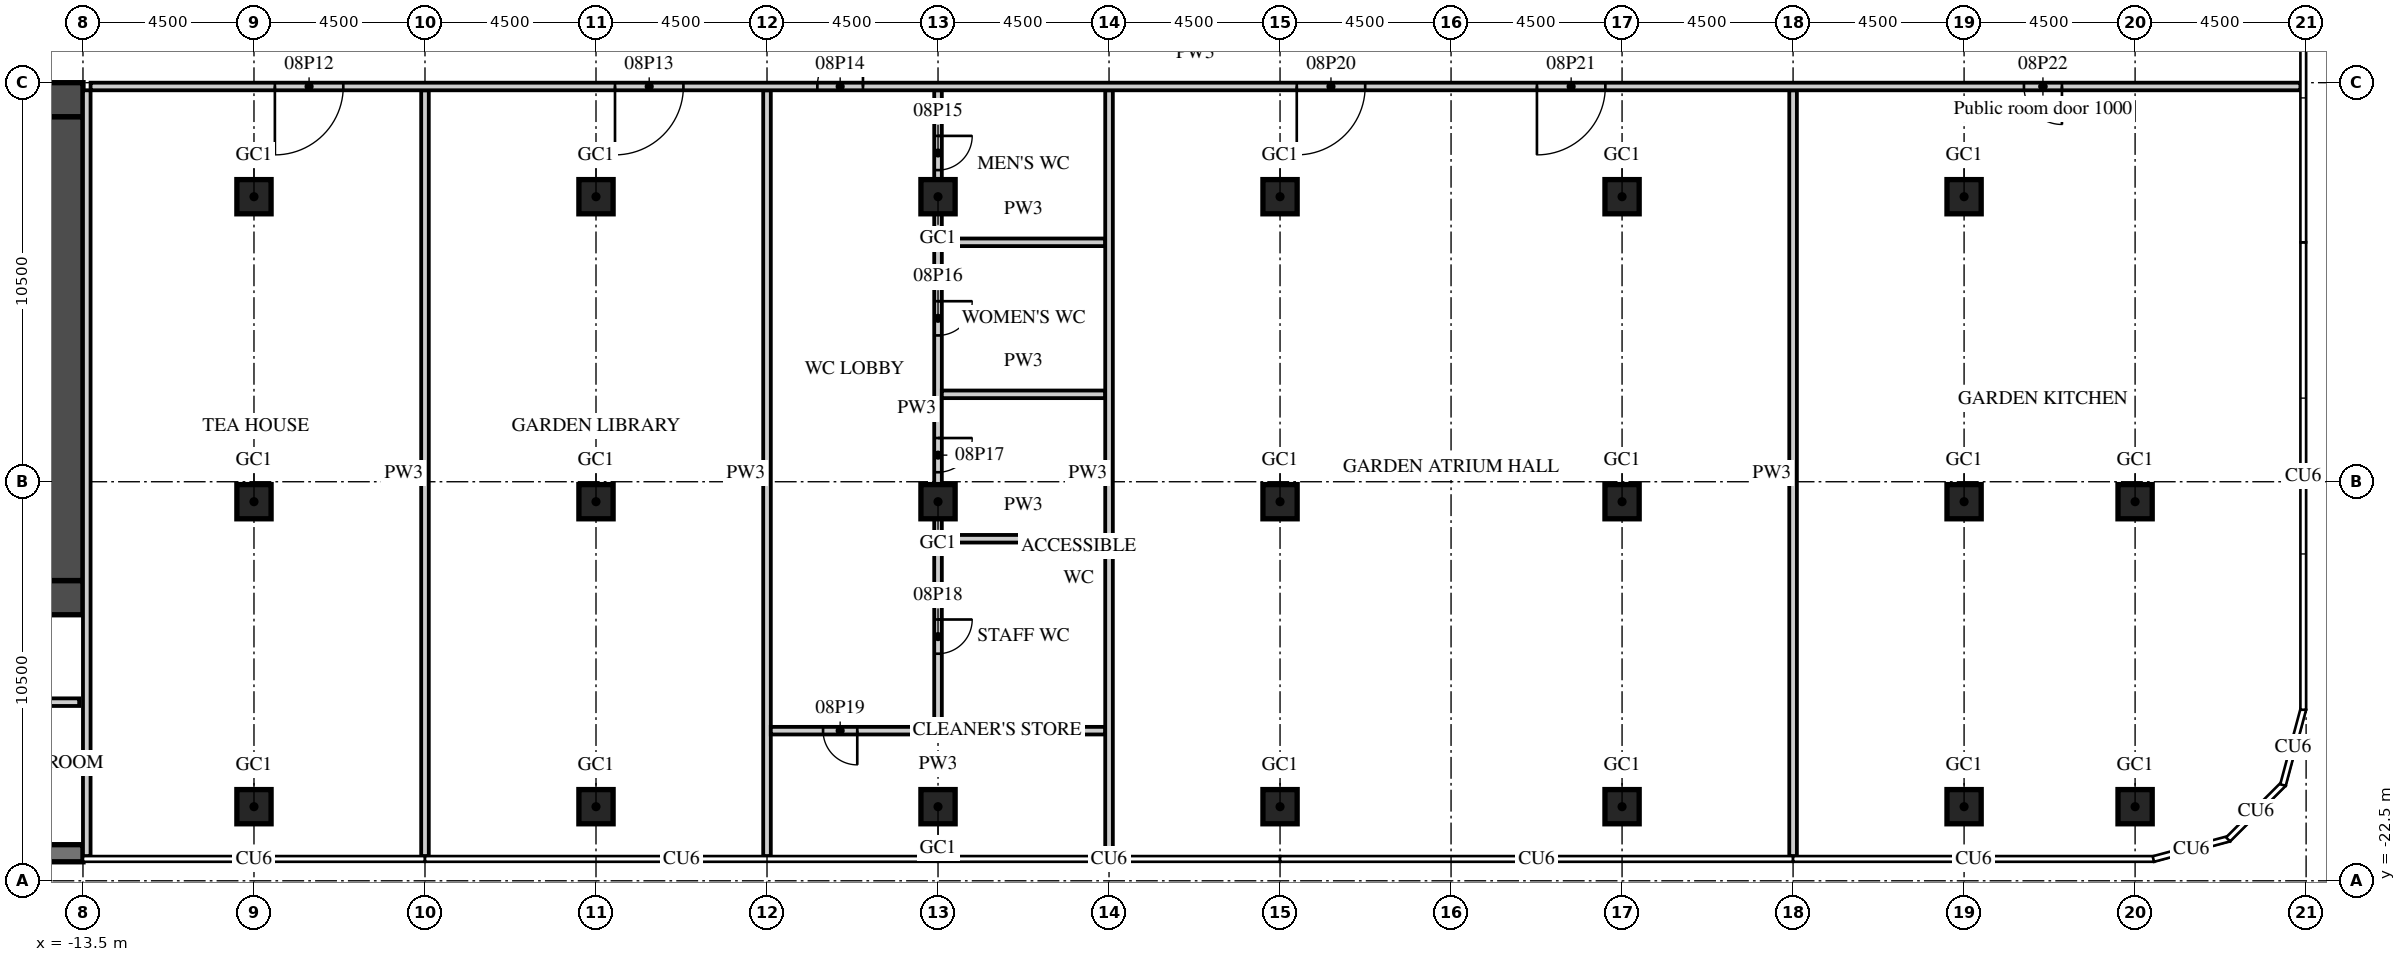
"""IFC4 building model, lengths in metres.
Left out: names, types, materials, properties, quantities, classifications, styles, units other than length and angle.
Written with IfcOpenShell. Run it as: python <this file> out.ifc"""

import sys

from ifc_helpers import new_model, si_unit, direction, frame, frame_2d, origin, origin_2d, place, context, subcontext, project, spatial, rectangle, extrude, element, fill, save


model = new_model("IFC4")
c1 = context("Model", 3, precision=1e-05, world=origin(), true_north=direction((0.0, 1.0)))
c2 = subcontext(c1, "Body", "Model", "MODEL_VIEW")
j1 = project(units=[si_unit("LENGTHUNIT", "METRE"), si_unit("PLANEANGLEUNIT", "RADIAN")], contexts=[c1])
p1 = place(None, origin())
s1 = spatial("IfcSite", under=j1, at=p1, CompositionType="ELEMENT")
p2 = place(p1, origin())
s2 = spatial("IfcBuilding", under=s1, at=p2, CompositionType="ELEMENT")
p3 = place(p2, frame((0.0, 0.0, 53.0)))
s3 = spatial("IfcBuildingStorey", under=s2, at=p3, CompositionType="ELEMENT", Elevation=53.0)
for number, where, z_axis, x_axis in (
    (1, (-9.0, -20.55, 0.0), (0.0, 0.0, 1.0), (1.0, 0.0, 0.0)),
    (2, (-9.0, -12.525, 0.0), (0.0, 0.0, 1.0), (1.0, 0.0, 0.0)),
    (3, (-9.0, -4.5, 0.0), (0.0, 0.0, 1.0), (1.0, 0.0, 0.0)),
    (4, (0.0, -20.55, 0.0), (0.0, 0.0, 1.0), (1.0, 0.0, 0.0)),
    (5, (0.0, -12.525, 0.0), (0.0, 0.0, 1.0), (1.0, 0.0, 0.0)),
    (6, (0.0, -4.5, 0.0), (0.0, 0.0, 1.0), (1.0, 0.0, 0.0)),
    (7, (9.0, -20.55, 0.0), (0.0, 0.0, 1.0), (1.0, 0.0, 0.0)),
    (8, (9.0, -12.525, 0.0), (0.0, 0.0, 1.0), (1.0, 0.0, 0.0)),
    (9, (9.0, -4.5, 0.0), (0.0, 0.0, 1.0), (1.0, 0.0, 0.0)),
    (10, (18.0, -20.55, 0.0), (0.0, 0.0, 1.0), (1.0, 0.0, 0.0)),
    (11, (18.0, -12.525, 0.0), (0.0, 0.0, 1.0), (1.0, 0.0, 0.0)),
    (12, (18.0, -4.5, 0.0), (0.0, 0.0, 1.0), (1.0, 0.0, 0.0)),
    (13, (27.0, -20.55, 0.0), (0.0, 0.0, 1.0), (1.0, 0.0, 0.0)),
    (14, (27.0, -12.525, 0.0), (0.0, 0.0, 1.0), (1.0, 0.0, 0.0)),
    (15, (27.0, -4.5, 0.0), (0.0, 0.0, 1.0), (1.0, 0.0, 0.0)),
    (16, (36.0, -20.55, 0.0), (0.0, 0.0, 1.0), (1.0, 0.0, 0.0)),
    (17, (36.0, -12.525, 0.0), (0.0, 0.0, 1.0), (1.0, 0.0, 0.0)),
    (18, (36.0, -4.5, 0.0), (0.0, 0.0, 1.0), (1.0, 0.0, 0.0)),
    (19, (40.5, -20.55, 0.0), (0.0, 0.0, 1.0), (1.0, 0.0, 0.0)),
    (20, (40.5, -12.525, 0.0), (0.0, 0.0, 1.0), (1.0, 0.0, 0.0)),
):
    element("IfcColumn", number, at=place(p3, frame(where, z_axis=z_axis, x_axis=x_axis)), inside=s3, PredefinedType="COLUMN", context=c2, shape_type="SweptSolid", body=[
        extrude(rectangle(XDim=0.9, YDim=0.9, at=origin_2d()), origin(), (0.0, 0.0, 1.0), 5.72),
    ])
p4 = place(p3, frame((-31.5, -21.775, 0.0), z_axis=(0.0, 0.0, 1.0), x_axis=(1.0, 0.0, 0.0)))
e21 = element("IfcWall", 21, at=p4, inside=s3, PredefinedType="SOLIDWALL", context=c2, shape_type="SweptSolid", body=[
    extrude(rectangle(XDim=18.0, YDim=0.45, at=frame_2d((9.0, 0.0))), origin(), (0.0, 0.0, 1.0), 6.72),
])
p5 = place(p3, frame((-31.5, -1.95, 0.0), z_axis=(0.0, 0.0, 1.0), x_axis=(1.0, 0.0, 0.0)))
e22 = element("IfcWall", 22, at=p5, inside=s3, PredefinedType="SHEAR", context=c2, shape_type="SweptSolid", body=[
    extrude(rectangle(XDim=18.0, YDim=0.9, at=frame_2d((9.0, 0.0))), origin(), (0.0, 0.0, 1.0), 6.72),
])
p6 = place(p5, frame((14.725, 0.0, 0.0)))
e23 = element("IfcOpeningElement", 23, at=p6, cuts=e22, PredefinedType="OPENING", context=c2, shape_type="SweptSolid", body=[
    extrude(rectangle(XDim=1.8, YDim=2.1, at=frame_2d((0.9, 1.05))), frame((0.0, 0.46, 0.0), z_axis=(0.0, -1.0, 0.0), x_axis=(1.0, 0.0, 0.0)), (0.0, 0.0, 1.0), 0.92),
])
p7 = place(p3, frame((-20.3, -15.05, 0.0), z_axis=(0.0, 0.0, 1.0), x_axis=(1.0, 0.0, 0.0)))
e24 = element("IfcWall", 24, at=p7, inside=s3, PredefinedType="SHEAR", context=c2, shape_type="SweptSolid", body=[
    extrude(rectangle(XDim=6.8, YDim=0.9, at=frame_2d((3.4, 0.0))), origin(), (0.0, 0.0, 1.0), 6.72),
])
p8 = place(p7, frame((0.875, 0.0, 0.0)))
e25 = element("IfcOpeningElement", 25, at=p8, cuts=e24, PredefinedType="OPENING", context=c2, shape_type="SweptSolid", body=[
    extrude(rectangle(XDim=1.2, YDim=2.1, at=frame_2d((0.6, 1.05))), frame((0.0, 0.46, 0.0), z_axis=(0.0, -1.0, 0.0), x_axis=(1.0, 0.0, 0.0)), (0.0, 0.0, 1.0), 0.92),
])
p9 = place(p3, frame((-13.95, -14.6, 0.0), z_axis=(0.0, 0.0, 1.0), x_axis=(0.0, 1.0, 0.0)))
e26 = element("IfcWall", 26, at=p9, inside=s3, PredefinedType="SHEAR", context=c2, shape_type="SweptSolid", body=[
    extrude(rectangle(XDim=12.2, YDim=0.9, at=frame_2d((6.1, 0.0))), origin(), (0.0, 0.0, 1.0), 6.72),
])
p10 = place(p3, frame((-44.85, -17.8, 0.0), z_axis=(0.0, 0.0, 1.0), x_axis=(1.0, 0.0, 0.0)))
e27 = element("IfcWall", 27, at=p10, inside=s3, PredefinedType="PARTITIONING", context=c2, shape_type="SweptSolid", body=[
    extrude(rectangle(XDim=31.25, YDim=0.2, at=frame_2d((15.625, 0.0))), origin(), (0.0, 0.0, 1.0), 6.72),
])
p11 = place(p10, frame((12.538, 0.0, 0.0)))
e28 = element("IfcOpeningElement", 28, at=p11, cuts=e27, PredefinedType="OPENING", context=c2, shape_type="SweptSolid", body=[
    extrude(rectangle(XDim=0.9, YDim=2.1, at=frame_2d((0.45, 1.05))), frame((0.0, 0.11, 0.0), z_axis=(0.0, -1.0, 0.0), x_axis=(1.0, 0.0, 0.0)), (0.0, 0.0, 1.0), 0.22),
])
p12 = place(p10, frame((20.837, 0.0, 0.0)))
e29 = element("IfcOpeningElement", 29, at=p12, cuts=e27, PredefinedType="OPENING", context=c2, shape_type="SweptSolid", body=[
    extrude(rectangle(XDim=0.9, YDim=2.1, at=frame_2d((0.45, 1.05))), frame((0.0, 0.11, 0.0), z_axis=(0.0, -1.0, 0.0), x_axis=(1.0, 0.0, 0.0)), (0.0, 0.0, 1.0), 0.22),
])
for number, where, z_axis, x_axis in (
    (30, (-4.5, -21.85, 0.0), (0.0, 0.0, 1.0), (0.0, 1.0, 0.0)),
    (31, (4.5, -21.85, 0.0), (0.0, 0.0, 1.0), (0.0, 1.0, 0.0)),
):
    element("IfcWall", number, at=place(p3, frame(where, z_axis=z_axis, x_axis=x_axis)), inside=s3, PredefinedType="PARTITIONING", context=c2, shape_type="SweptSolid", body=[
        extrude(rectangle(XDim=20.15, YDim=0.2, at=frame_2d((10.075, 0.0))), origin(), (0.0, 0.0, 1.0), 6.72),
    ])
p13 = place(p3, frame((9.0, -18.45, 0.0), z_axis=(0.0, 0.0, 1.0), x_axis=(0.0, 1.0, 0.0)))
e32 = element("IfcWall", 32, at=p13, inside=s3, PredefinedType="PARTITIONING", context=c2, shape_type="SweptSolid", body=[
    extrude(rectangle(XDim=16.75, YDim=0.2, at=frame_2d((8.375, 0.0))), origin(), (0.0, 0.0, 1.0), 5.72),
])
p14 = place(p13, frame((14.65, 0.0, 0.0)))
e33 = element("IfcOpeningElement", 33, at=p14, cuts=e32, PredefinedType="OPENING", context=c2, shape_type="SweptSolid", body=[
    extrude(rectangle(XDim=0.9, YDim=2.1, at=frame_2d((0.45, 1.05))), frame((0.0, 0.11, 0.0), z_axis=(0.0, -1.0, 0.0), x_axis=(1.0, 0.0, 0.0)), (0.0, 0.0, 1.0), 0.22),
])
p15 = place(p13, frame((10.3, 0.0, 0.0)))
e34 = element("IfcOpeningElement", 34, at=p15, cuts=e32, PredefinedType="OPENING", context=c2, shape_type="SweptSolid", body=[
    extrude(rectangle(XDim=0.9, YDim=2.1, at=frame_2d((0.45, 1.05))), frame((0.0, 0.11, 0.0), z_axis=(0.0, -1.0, 0.0), x_axis=(1.0, 0.0, 0.0)), (0.0, 0.0, 1.0), 0.22),
])
p16 = place(p13, frame((6.7, 0.0, 0.0)))
e35 = element("IfcOpeningElement", 35, at=p16, cuts=e32, PredefinedType="OPENING", context=c2, shape_type="SweptSolid", body=[
    extrude(rectangle(XDim=0.9, YDim=2.1, at=frame_2d((0.45, 1.05))), frame((0.0, 0.11, 0.0), z_axis=(0.0, -1.0, 0.0), x_axis=(1.0, 0.0, 0.0)), (0.0, 0.0, 1.0), 0.22),
])
p17 = place(p13, frame((1.925, 0.0, 0.0)))
e36 = element("IfcOpeningElement", 36, at=p17, cuts=e32, PredefinedType="OPENING", context=c2, shape_type="SweptSolid", body=[
    extrude(rectangle(XDim=0.9, YDim=2.1, at=frame_2d((0.45, 1.05))), frame((0.0, 0.11, 0.0), z_axis=(0.0, -1.0, 0.0), x_axis=(1.0, 0.0, 0.0)), (0.0, 0.0, 1.0), 0.22),
])
for number, where, z_axis, x_axis in (
    (37, (9.1, -5.7, 0.0), (0.0, 0.0, 1.0), (1.0, 0.0, 0.0)),
    (38, (9.1, -9.7, 0.0), (0.0, 0.0, 1.0), (1.0, 0.0, 0.0)),
    (39, (9.1, -13.5, 0.0), (0.0, 0.0, 1.0), (1.0, 0.0, 0.0)),
):
    element("IfcWall", number, at=place(p3, frame(where, z_axis=z_axis, x_axis=x_axis)), inside=s3, PredefinedType="PARTITIONING", context=c2, shape_type="SweptSolid", body=[
        extrude(rectangle(XDim=4.3, YDim=0.2, at=frame_2d((2.15, 0.0))), origin(), (0.0, 0.0, 1.0), 5.72),
    ])
p18 = place(p3, frame((4.6, -18.55, 0.0), z_axis=(0.0, 0.0, 1.0), x_axis=(1.0, 0.0, 0.0)))
e40 = element("IfcWall", 40, at=p18, inside=s3, PredefinedType="PARTITIONING", context=c2, shape_type="SweptSolid", body=[
    extrude(rectangle(XDim=8.8, YDim=0.2, at=frame_2d((4.4, 0.0))), origin(), (0.0, 0.0, 1.0), 5.72),
])
p19 = place(p18, frame((1.375, 0.0, 0.0)))
e41 = element("IfcOpeningElement", 41, at=p19, cuts=e40, PredefinedType="OPENING", context=c2, shape_type="SweptSolid", body=[
    extrude(rectangle(XDim=0.9, YDim=2.1, at=frame_2d((0.45, 1.05))), frame((0.0, 0.11, 0.0), z_axis=(0.0, -1.0, 0.0), x_axis=(1.0, 0.0, 0.0)), (0.0, 0.0, 1.0), 0.22),
])
for number, where, z_axis, x_axis in (
    (42, (13.5, -21.85, 0.0), (0.0, 0.0, 1.0), (0.0, 1.0, 0.0)),
    (43, (31.5, -21.85, 0.0), (0.0, 0.0, 1.0), (0.0, 1.0, 0.0)),
):
    element("IfcWall", number, at=place(p3, frame(where, z_axis=z_axis, x_axis=x_axis)), inside=s3, PredefinedType="PARTITIONING", context=c2, shape_type="SweptSolid", body=[
        extrude(rectangle(XDim=20.15, YDim=0.2, at=frame_2d((10.075, 0.0))), origin(), (0.0, 0.0, 1.0), 6.72),
    ])
p20 = place(p3, frame((-13.3, -1.6, 0.0), z_axis=(0.0, 0.0, 1.0), x_axis=(1.0, 0.0, 0.0)))
e44 = element("IfcWall", 44, at=p20, inside=s3, PredefinedType="PARTITIONING", context=c2, shape_type="SweptSolid", body=[
    extrude(rectangle(XDim=58.15, YDim=0.2, at=frame_2d((29.075, 0.0))), origin(), (0.0, 0.0, 1.0), 5.72),
])
p21 = place(p20, frame((4.85, 0.0, 0.0)))
e45 = element("IfcOpeningElement", 45, at=p21, cuts=e44, PredefinedType="OPENING", context=c2, shape_type="SweptSolid", body=[
    extrude(rectangle(XDim=1.8, YDim=2.1, at=frame_2d((0.9, 1.05))), frame((0.0, 0.11, 0.0), z_axis=(0.0, -1.0, 0.0), x_axis=(1.0, 0.0, 0.0)), (0.0, 0.0, 1.0), 0.22),
])
p22 = place(p20, frame((13.8, 0.0, 0.0)))
e46 = element("IfcOpeningElement", 46, at=p22, cuts=e44, PredefinedType="OPENING", context=c2, shape_type="SweptSolid", body=[
    extrude(rectangle(XDim=1.8, YDim=2.1, at=frame_2d((0.9, 1.05))), frame((0.0, 0.11, 0.0), z_axis=(0.0, -1.0, 0.0), x_axis=(1.0, 0.0, 0.0)), (0.0, 0.0, 1.0), 0.22),
])
p23 = place(p20, frame((19.125, 0.0, 0.0)))
e47 = element("IfcOpeningElement", 47, at=p23, cuts=e44, PredefinedType="OPENING", context=c2, shape_type="SweptSolid", body=[
    extrude(rectangle(XDim=1.2, YDim=2.1, at=frame_2d((0.6, 1.05))), frame((0.0, 0.11, 0.0), z_axis=(0.0, -1.0, 0.0), x_axis=(1.0, 0.0, 0.0)), (0.0, 0.0, 1.0), 0.22),
])
p24 = place(p20, frame((31.74, 0.0, 0.0)))
e48 = element("IfcOpeningElement", 48, at=p24, cuts=e44, PredefinedType="OPENING", context=c2, shape_type="SweptSolid", body=[
    extrude(rectangle(XDim=1.8, YDim=2.1, at=frame_2d((0.9, 1.05))), frame((0.0, 0.11, 0.0), z_axis=(0.0, -1.0, 0.0), x_axis=(1.0, 0.0, 0.0)), (0.0, 0.0, 1.0), 0.22),
])
p25 = place(p20, frame((38.06, 0.0, 0.0)))
e49 = element("IfcOpeningElement", 49, at=p25, cuts=e44, PredefinedType="OPENING", context=c2, shape_type="SweptSolid", body=[
    extrude(rectangle(XDim=1.8, YDim=2.1, at=frame_2d((0.9, 1.05))), frame((0.0, 0.11, 0.0), z_axis=(0.0, -1.0, 0.0), x_axis=(1.0, 0.0, 0.0)), (0.0, 0.0, 1.0), 0.22),
])
p26 = place(p20, frame((50.875, 0.0, 0.0)))
e50 = element("IfcOpeningElement", 50, at=p26, cuts=e44, PredefinedType="OPENING", context=c2, shape_type="SweptSolid", body=[
    extrude(rectangle(XDim=1.0, YDim=2.1, at=frame_2d((0.5, 1.05))), frame((0.0, 0.11, 0.0), z_axis=(0.0, -1.0, 0.0), x_axis=(1.0, 0.0, 0.0)), (0.0, 0.0, 1.0), 0.22),
])
p27 = place(p3, frame((-13.4, -21.85, 0.0), z_axis=(0.0, 0.0, 1.0), x_axis=(0.0, 1.0, 0.0)))
e51 = element("IfcWall", 51, at=p27, inside=s3, PredefinedType="PARTITIONING", context=c2, shape_type="SweptSolid", body=[
    extrude(rectangle(XDim=20.15, YDim=0.2, at=frame_2d((10.075, 0.0))), origin(), (0.0, 0.0, 1.0), 6.72),
])
p28 = place(p21, origin())
e52 = element("IfcDoor", 52, at=p28, inside=s3, OperationType="DOUBLE_DOOR_DOUBLE_SWING", PredefinedType="DOOR", context=c2, shape_type="SweptSolid", body=[
    extrude(rectangle(XDim=1.8, YDim=2.1, at=frame_2d((0.9, 1.05))), frame((0.0, 0.025, 0.0), z_axis=(0.0, -1.0, 0.0), x_axis=(1.0, 0.0, 0.0)), (0.0, 0.0, 1.0), 0.05),
])
fill(e45, e52)
p29 = place(p22, origin())
e53 = element("IfcDoor", 53, at=p29, inside=s3, OperationType="DOUBLE_DOOR_DOUBLE_SWING", PredefinedType="DOOR", context=c2, shape_type="SweptSolid", body=[
    extrude(rectangle(XDim=1.8, YDim=2.1, at=frame_2d((0.9, 1.05))), frame((0.0, 0.025, 0.0), z_axis=(0.0, -1.0, 0.0), x_axis=(1.0, 0.0, 0.0)), (0.0, 0.0, 1.0), 0.05),
])
fill(e46, e53)
p30 = place(p23, origin())
e54 = element("IfcDoor", 54, at=p30, inside=s3, OperationType="SINGLE_SWING_RIGHT", PredefinedType="DOOR", context=c2, shape_type="SweptSolid", body=[
    extrude(rectangle(XDim=1.2, YDim=2.1, at=frame_2d((0.6, 1.05))), frame((0.0, 0.025, 0.0), z_axis=(0.0, -1.0, 0.0), x_axis=(1.0, 0.0, 0.0)), (0.0, 0.0, 1.0), 0.05),
])
fill(e47, e54)
p31 = place(p14, origin())
e55 = element("IfcDoor", 55, at=p31, inside=s3, OperationType="SINGLE_SWING_RIGHT", PredefinedType="DOOR", context=c2, shape_type="SweptSolid", body=[
    extrude(rectangle(XDim=0.9, YDim=2.1, at=frame_2d((0.45, 1.05))), frame((0.0, 0.025, 0.0), z_axis=(0.0, -1.0, 0.0), x_axis=(1.0, 0.0, 0.0)), (0.0, 0.0, 1.0), 0.05),
])
fill(e33, e55)
p32 = place(p15, origin())
e56 = element("IfcDoor", 56, at=p32, inside=s3, OperationType="SINGLE_SWING_RIGHT", PredefinedType="DOOR", context=c2, shape_type="SweptSolid", body=[
    extrude(rectangle(XDim=0.9, YDim=2.1, at=frame_2d((0.45, 1.05))), frame((0.0, 0.025, 0.0), z_axis=(0.0, -1.0, 0.0), x_axis=(1.0, 0.0, 0.0)), (0.0, 0.0, 1.0), 0.05),
])
fill(e34, e56)
p33 = place(p16, origin())
e57 = element("IfcDoor", 57, at=p33, inside=s3, OperationType="SINGLE_SWING_RIGHT", PredefinedType="DOOR", context=c2, shape_type="SweptSolid", body=[
    extrude(rectangle(XDim=0.9, YDim=2.1, at=frame_2d((0.45, 1.05))), frame((0.0, 0.025, 0.0), z_axis=(0.0, -1.0, 0.0), x_axis=(1.0, 0.0, 0.0)), (0.0, 0.0, 1.0), 0.05),
])
fill(e35, e57)
p34 = place(p17, origin())
e58 = element("IfcDoor", 58, at=p34, inside=s3, OperationType="SINGLE_SWING_RIGHT", PredefinedType="DOOR", context=c2, shape_type="SweptSolid", body=[
    extrude(rectangle(XDim=0.9, YDim=2.1, at=frame_2d((0.45, 1.05))), frame((0.0, 0.025, 0.0), z_axis=(0.0, -1.0, 0.0), x_axis=(1.0, 0.0, 0.0)), (0.0, 0.0, 1.0), 0.05),
])
fill(e36, e58)
p35 = place(p19, origin())
e59 = element("IfcDoor", 59, at=p35, inside=s3, OperationType="SINGLE_SWING_RIGHT", PredefinedType="DOOR", context=c2, shape_type="SweptSolid", body=[
    extrude(rectangle(XDim=0.9, YDim=2.1, at=frame_2d((0.45, 1.05))), frame((0.0, 0.025, 0.0), z_axis=(0.0, -1.0, 0.0), x_axis=(1.0, 0.0, 0.0)), (0.0, 0.0, 1.0), 0.05),
])
fill(e41, e59)
p36 = place(p24, origin())
e60 = element("IfcDoor", 60, at=p36, inside=s3, OperationType="DOUBLE_DOOR_DOUBLE_SWING", PredefinedType="DOOR", context=c2, shape_type="SweptSolid", body=[
    extrude(rectangle(XDim=1.8, YDim=2.1, at=frame_2d((0.9, 1.05))), frame((0.0, 0.025, 0.0), z_axis=(0.0, -1.0, 0.0), x_axis=(1.0, 0.0, 0.0)), (0.0, 0.0, 1.0), 0.05),
])
fill(e48, e60)
p37 = place(p25, origin())
e61 = element("IfcDoor", 61, at=p37, inside=s3, OperationType="DOUBLE_DOOR_DOUBLE_SWING", PredefinedType="DOOR", context=c2, shape_type="SweptSolid", body=[
    extrude(rectangle(XDim=1.8, YDim=2.1, at=frame_2d((0.9, 1.05))), frame((0.0, 0.025, 0.0), z_axis=(0.0, -1.0, 0.0), x_axis=(1.0, 0.0, 0.0)), (0.0, 0.0, 1.0), 0.05),
])
fill(e49, e61)
p38 = place(p26, origin())
e62 = element("IfcDoor", 62, at=p38, inside=s3, OperationType="SINGLE_SWING_RIGHT", PredefinedType="DOOR", context=c2, shape_type="SweptSolid", body=[
    extrude(rectangle(XDim=1.0, YDim=2.1, at=frame_2d((0.5, 1.05))), frame((0.0, 0.025, 0.0), z_axis=(0.0, -1.0, 0.0), x_axis=(1.0, 0.0, 0.0)), (0.0, 0.0, 1.0), 0.05),
])
fill(e50, e62)
save(model, sys.argv[1])
